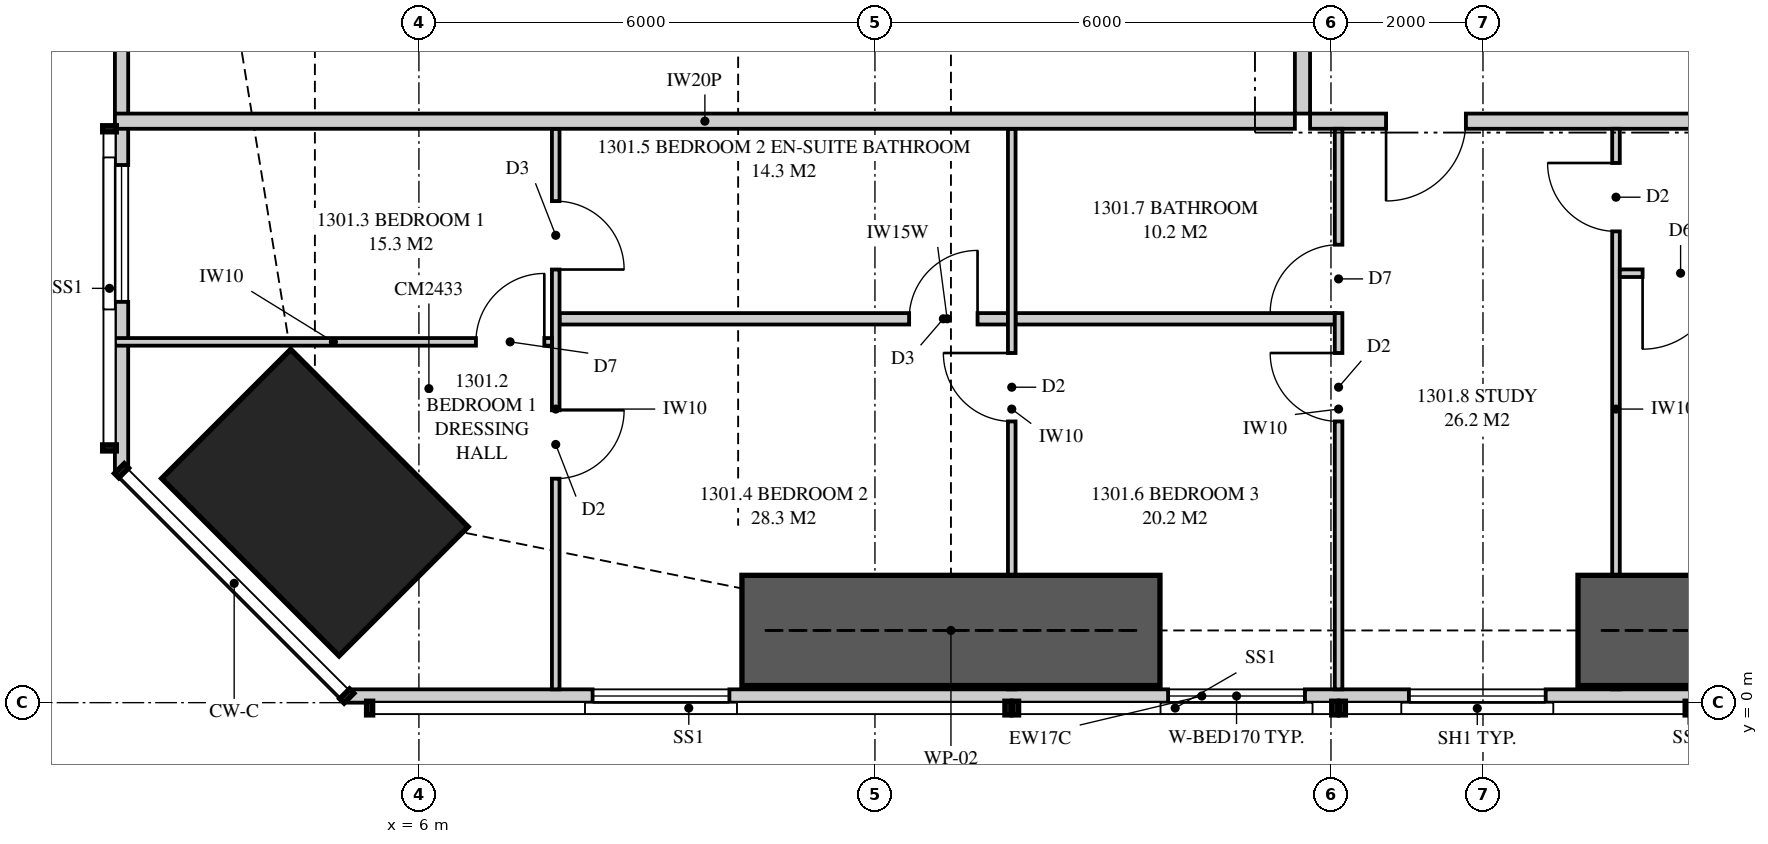
"""IFC4 building model, lengths in metres.
Left out: names, types, materials, properties, quantities, classifications, styles, units other than length and angle.
Written with IfcOpenShell. Run it as: python <this file> out.ifc"""

import sys

from ifc_helpers import new_model, si_unit, direction, frame, frame_2d, origin, origin_2d, place, context, subcontext, project, spatial, polyline, rectangle, outline, extrude, element, fill, save


model = new_model("IFC4")
c1 = context("Model", 3, precision=1e-05, world=origin(), true_north=direction((0.0, 1.0)))
c2 = subcontext(c1, "Body", "Model", "MODEL_VIEW")
j1 = project(units=[si_unit("LENGTHUNIT", "METRE"), si_unit("PLANEANGLEUNIT", "RADIAN")], contexts=[c1])
p1 = place(None, origin())
s1 = spatial("IfcSite", under=j1, at=p1, CompositionType="ELEMENT")
p2 = place(p1, origin())
s2 = spatial("IfcBuilding", under=s1, at=p2, CompositionType="ELEMENT")
p3 = place(p2, frame((0.0, 0.0, 51.15)))
s3 = spatial("IfcBuildingStorey", under=s2, at=p3, CompositionType="ELEMENT", Elevation=51.15)
p4 = place(p3, frame((4.631, 2.631, 0.0), z_axis=(0.0, 0.0, 1.0), x_axis=(0.707106781187, 0.707106781187, 0.0)))
e1 = element("IfcColumn", 1, at=p4, inside=s3, PredefinedType="COLUMN", context=c2, shape_type="SweptSolid", body=[
    extrude(rectangle(XDim=2.4, YDim=3.3, at=origin_2d()), origin(), (0.0, 0.0, 1.0), 3.35),
])
p5 = place(p3, frame((5.051, 0.087, 0.0), z_axis=(0.0, 0.0, 1.0), x_axis=(1.0, 0.0, 0.0)))
e2 = element("IfcWall", 2, at=p5, inside=s3, PredefinedType="SOLIDWALL", context=c2, shape_type="SweptSolid", body=[
    extrude(outline(polyline([(0.0, 0.0), (22.499, 0.0), (22.499, 2.15), (7.949, 2.15), (7.949, 3.11), (7.793, 3.11), (7.793, 2.15), (7.745, 2.15), (7.745, 3.11), (0.0, 3.11), (0.0, 0.0)])), frame((0.0, 0.087, 0.0), z_axis=(0.0, -1.0, 0.0), x_axis=(1.0, 0.0, 0.0)), (0.0, 0.0, 1.0), 0.175),
])
p6 = place(p5, frame((3.234, 0.0, 0.4)))
e3 = element("IfcOpeningElement", 3, at=p6, cuts=e2, PredefinedType="OPENING", context=c2, shape_type="SweptSolid", body=[
    extrude(rectangle(XDim=1.8, YDim=1.7, at=frame_2d((0.9, 0.85))), frame((0.0, 0.097, 0.0), z_axis=(0.0, -1.0, 0.0), x_axis=(1.0, 0.0, 0.0)), (0.0, 0.0, 1.0), 0.195),
])
p7 = place(p5, frame((10.806, 0.0, 0.4)))
e4 = element("IfcOpeningElement", 4, at=p7, cuts=e2, PredefinedType="OPENING", context=c2, shape_type="SweptSolid", body=[
    extrude(rectangle(XDim=1.8, YDim=1.7, at=frame_2d((0.9, 0.85))), frame((0.0, 0.097, 0.0), z_axis=(0.0, -1.0, 0.0), x_axis=(1.0, 0.0, 0.0)), (0.0, 0.0, 1.0), 0.195),
])
p8 = place(p5, frame((13.974, 0.0, 0.4)))
e5 = element("IfcOpeningElement", 5, at=p8, cuts=e2, PredefinedType="OPENING", context=c2, shape_type="SweptSolid", body=[
    extrude(rectangle(XDim=1.8, YDim=1.7, at=frame_2d((0.9, 0.85))), frame((0.0, 0.097, 0.0), z_axis=(0.0, -1.0, 0.0), x_axis=(1.0, 0.0, 0.0)), (0.0, 0.0, 1.0), 0.195),
])
p9 = place(p3, frame((2.087, 18.8, 0.0), z_axis=(0.0, 0.0, 1.0), x_axis=(0.0, -1.0, 0.0)))
e6 = element("IfcWall", 6, at=p9, inside=s3, PredefinedType="SOLIDWALL", context=c2, shape_type="SweptSolid", body=[
    extrude(outline(polyline([(0.0, 0.0), (15.749, 0.0), (15.749, 3.11), (6.019, 3.11), (6.019, 2.15), (5.926, 2.15), (5.926, 3.11), (5.8, 3.11), (5.8, 2.15), (0.0, 2.15), (0.0, 0.0)])), frame((0.0, 0.087, 0.0), z_axis=(0.0, -1.0, 0.0), x_axis=(1.0, 0.0, 0.0)), (0.0, 0.0, 1.0), 0.175),
])
p10 = place(p9, frame((0.95, 0.0, 0.4)))
e7 = element("IfcOpeningElement", 7, at=p10, cuts=e6, PredefinedType="OPENING", context=c2, shape_type="SweptSolid", body=[
    extrude(rectangle(XDim=1.8, YDim=1.7, at=frame_2d((0.9, 0.85))), frame((0.0, 0.097, 0.0), z_axis=(0.0, -1.0, 0.0), x_axis=(1.0, 0.0, 0.0)), (0.0, 0.0, 1.0), 0.195),
])
p11 = place(p9, frame((8.69, 0.0, 0.4)))
e8 = element("IfcOpeningElement", 8, at=p11, cuts=e6, PredefinedType="OPENING", context=c2, shape_type="SweptSolid", body=[
    extrude(rectangle(XDim=1.2, YDim=1.7, at=frame_2d((0.6, 0.85))), frame((0.0, 0.097, 0.0), z_axis=(0.0, -1.0, 0.0), x_axis=(1.0, 0.0, 0.0)), (0.0, 0.0, 1.0), 0.195),
])
p12 = place(p9, frame((11.727, 0.0, 0.4)))
e9 = element("IfcOpeningElement", 9, at=p12, cuts=e6, PredefinedType="OPENING", context=c2, shape_type="SweptSolid", body=[
    extrude(rectangle(XDim=1.8, YDim=1.7, at=frame_2d((0.9, 0.85))), frame((0.0, 0.097, 0.0), z_axis=(0.0, -1.0, 0.0), x_axis=(1.0, 0.0, 0.0)), (0.0, 0.0, 1.0), 0.195),
])
p13 = place(p3, frame((17.725, 7.65, 0.0), z_axis=(0.0, 0.0, 1.0), x_axis=(1.0, 0.0, 0.0)))
e10 = element("IfcWall", 10, at=p13, inside=s3, PredefinedType="PARTITIONING", context=c2, shape_type="SweptSolid", body=[
    extrude(outline(polyline([(0.0, 0.0), (18.625, 0.0), (18.625, 3.11), (17.612, 3.11), (17.612, 2.541), (16.938, 2.541), (16.938, 3.11), (6.612, 3.11), (6.612, 2.541), (5.938, 2.541), (5.938, 3.11), (0.0, 3.11), (0.0, 0.0)])), frame((0.0, 0.1, 0.0), z_axis=(0.0, -1.0, 0.0), x_axis=(1.0, 0.0, 0.0)), (0.0, 0.0, 1.0), 0.2),
])
p14 = place(p13, frame((1.0, 0.0, 0.0)))
e11 = element("IfcOpeningElement", 11, at=p14, cuts=e10, PredefinedType="OPENING", context=c2, shape_type="SweptSolid", body=[
    extrude(rectangle(XDim=1.05, YDim=2.2, at=frame_2d((0.525, 1.1))), frame((0.0, 0.11, 0.0), z_axis=(0.0, -1.0, 0.0), x_axis=(1.0, 0.0, 0.0)), (0.0, 0.0, 1.0), 0.22),
])
p15 = place(p3, frame((7.8, 0.175, 0.0), z_axis=(0.0, 0.0, 1.0), x_axis=(0.0, 1.0, 0.0)))
e12 = element("IfcWall", 12, at=p15, inside=s3, PredefinedType="PARTITIONING", context=c2, shape_type="SweptSolid", body=[
    extrude(outline(polyline([(0.0, 0.0), (7.375, 0.0), (7.375, 3.11), (2.697, 3.11), (2.697, 2.15), (0.943, 2.15), (0.943, 3.11), (0.0, 3.11), (0.0, 0.0)])), frame((0.0, 0.05, 0.0), z_axis=(0.0, -1.0, 0.0), x_axis=(1.0, 0.0, 0.0)), (0.0, 0.0, 1.0), 0.1),
])
p16 = place(p15, frame((2.772, 0.0, 0.0)))
e13 = element("IfcOpeningElement", 13, at=p16, cuts=e12, PredefinedType="OPENING", context=c2, shape_type="SweptSolid", body=[
    extrude(rectangle(XDim=0.9, YDim=2.1, at=frame_2d((0.45, 1.05))), frame((0.0, 0.06, 0.0), z_axis=(0.0, -1.0, 0.0), x_axis=(1.0, 0.0, 0.0)), (0.0, 0.0, 1.0), 0.12),
])
p17 = place(p15, frame((5.523, 0.0, 0.0)))
e14 = element("IfcOpeningElement", 14, at=p17, cuts=e12, PredefinedType="OPENING", context=c2, shape_type="SweptSolid", body=[
    extrude(rectangle(XDim=0.9, YDim=2.1, at=frame_2d((0.45, 1.05))), frame((0.0, 0.06, 0.0), z_axis=(0.0, -1.0, 0.0), x_axis=(1.0, 0.0, 0.0)), (0.0, 0.0, 1.0), 0.12),
])
p18 = place(p3, frame((13.8, 0.175, 0.0), z_axis=(0.0, 0.0, 1.0), x_axis=(0.0, 1.0, 0.0)))
e15 = element("IfcWall", 15, at=p18, inside=s3, PredefinedType="PARTITIONING", context=c2, shape_type="SweptSolid", body=[
    extrude(outline(polyline([(1.635, 2.15), (0.0, 2.15), (0.0, 0.0), (7.375, 0.0), (7.375, 3.11), (1.635, 3.11), (1.635, 2.15)]), holes=[polyline([(1.021, 0.133), (0.529, 0.133), (0.529, 0.923), (1.021, 0.923), (1.021, 0.133)]), polyline([(1.021, 1.227), (0.529, 1.227), (0.529, 2.017), (1.021, 2.017), (1.021, 1.227)])]), frame((0.0, 0.05, 0.0), z_axis=(0.0, -1.0, 0.0), x_axis=(1.0, 0.0, 0.0)), (0.0, 0.0, 1.0), 0.1),
])
p19 = place(p18, frame((3.525, 0.0, 0.0)))
e16 = element("IfcOpeningElement", 16, at=p19, cuts=e15, PredefinedType="OPENING", context=c2, shape_type="SweptSolid", body=[
    extrude(rectangle(XDim=0.9, YDim=2.1, at=frame_2d((0.45, 1.05))), frame((0.0, 0.06, 0.0), z_axis=(0.0, -1.0, 0.0), x_axis=(1.0, 0.0, 0.0)), (0.0, 0.0, 1.0), 0.12),
])
p20 = place(p3, frame((18.1, 0.175, 0.0), z_axis=(0.0, 0.0, 1.0), x_axis=(0.0, 1.0, 0.0)))
e17 = element("IfcWall", 17, at=p20, inside=s3, PredefinedType="PARTITIONING", context=c2, shape_type="SweptSolid", body=[
    extrude(outline(polyline([(0.0, 0.0), (7.375, 0.0), (7.375, 3.11), (1.635, 3.11), (1.635, 2.15), (0.0, 2.15), (0.0, 3.11), (0.0, 0.0)])), frame((0.0, 0.05, 0.0), z_axis=(0.0, -1.0, 0.0), x_axis=(1.0, 0.0, 0.0)), (0.0, 0.0, 1.0), 0.1),
])
p21 = place(p20, frame((3.525, 0.0, 0.0)))
e18 = element("IfcOpeningElement", 18, at=p21, cuts=e17, PredefinedType="OPENING", context=c2, shape_type="SweptSolid", body=[
    extrude(rectangle(XDim=0.9, YDim=2.1, at=frame_2d((0.45, 1.05))), frame((0.0, 0.06, 0.0), z_axis=(0.0, -1.0, 0.0), x_axis=(1.0, 0.0, 0.0)), (0.0, 0.0, 1.0), 0.12),
])
p22 = place(p20, frame((4.95, 0.0, 0.0)))
e19 = element("IfcOpeningElement", 19, at=p22, cuts=e17, PredefinedType="OPENING", context=c2, shape_type="SweptSolid", body=[
    extrude(rectangle(XDim=0.9, YDim=2.1, at=frame_2d((0.45, 1.05))), frame((0.0, 0.06, 0.0), z_axis=(0.0, -1.0, 0.0), x_axis=(1.0, 0.0, 0.0)), (0.0, 0.0, 1.0), 0.12),
])
p23 = place(p3, frame((2.0, 4.747, 0.0), z_axis=(0.0, 0.0, 1.0), x_axis=(1.0, 0.0, 0.0)))
e20 = element("IfcWall", 20, at=p23, inside=s3, PredefinedType="PARTITIONING", context=c2, shape_type="SweptSolid", body=[
    extrude(outline(polyline([(0.0, 0.0), (5.75, 0.0), (5.75, 3.11), (3.16, 3.11), (3.16, 2.15), (1.417, 2.15), (1.417, 3.11), (0.0, 3.11), (0.0, 0.0)])), frame((0.0, 0.05, 0.0), z_axis=(0.0, -1.0, 0.0), x_axis=(1.0, 0.0, 0.0)), (0.0, 0.0, 1.0), 0.1),
])
p24 = place(p23, frame((4.75, 0.0, 0.0)))
e21 = element("IfcOpeningElement", 21, at=p24, cuts=e20, PredefinedType="OPENING", context=c2, shape_type="SweptSolid", body=[
    extrude(rectangle(XDim=0.9, YDim=2.1, at=frame_2d((0.45, 1.05))), frame((0.0, 0.06, 0.0), z_axis=(0.0, -1.0, 0.0), x_axis=(1.0, 0.0, 0.0)), (0.0, 0.0, 1.0), 0.12),
])
p25 = place(p3, frame((7.85, 5.05, 0.0), z_axis=(0.0, 0.0, 1.0), x_axis=(1.0, 0.0, 0.0)))
e22 = element("IfcWall", 22, at=p25, inside=s3, PredefinedType="PLUMBINGWALL", context=c2, shape_type="SweptSolid", body=[
    extrude(outline(polyline([(0.0, 0.0), (5.9, 0.0), (5.9, 3.11), (5.462, 3.11), (5.462, 2.541), (4.838, 2.541), (4.838, 3.11), (3.635, 3.11), (3.635, 2.51), (1.065, 2.51), (1.065, 3.11), (0.0, 3.11), (0.0, 0.0)])), frame((0.0, 0.075, 0.0), z_axis=(0.0, -1.0, 0.0), x_axis=(1.0, 0.0, 0.0)), (0.0, 0.0, 1.0), 0.15),
])
p26 = place(p25, frame((4.6, 0.0, 0.0)))
e23 = element("IfcOpeningElement", 23, at=p26, cuts=e22, PredefinedType="OPENING", context=c2, shape_type="SweptSolid", body=[
    extrude(rectangle(XDim=0.9, YDim=2.1, at=frame_2d((0.45, 1.05))), frame((0.0, 0.085, 0.0), z_axis=(0.0, -1.0, 0.0), x_axis=(1.0, 0.0, 0.0)), (0.0, 0.0, 1.0), 0.17),
])
p27 = place(p3, frame((13.85, 5.05, 0.0), z_axis=(0.0, 0.0, 1.0), x_axis=(1.0, 0.0, 0.0)))
e24 = element("IfcWall", 24, at=p27, inside=s3, PredefinedType="PLUMBINGWALL", context=c2, shape_type="SweptSolid", body=[
    extrude(rectangle(XDim=4.2, YDim=0.15, at=frame_2d((2.1, 0.0))), origin(), (0.0, 0.0, 1.0), 3.11),
])
p28 = place(p3, frame((21.75, 0.175, 0.0), z_axis=(0.0, 0.0, 1.0), x_axis=(0.0, 1.0, 0.0)))
e25 = element("IfcWall", 25, at=p28, inside=s3, PredefinedType="PARTITIONING", context=c2, shape_type="SweptSolid", body=[
    extrude(outline(polyline([(0.0, 0.0), (7.375, 0.0), (7.375, 3.11), (1.635, 3.11), (1.635, 2.15), (0.0, 2.15), (0.0, 3.11), (0.0, 0.0)])), frame((0.0, 0.05, 0.0), z_axis=(0.0, -1.0, 0.0), x_axis=(1.0, 0.0, 0.0)), (0.0, 0.0, 1.0), 0.1),
])
p29 = place(p28, frame((6.025, 0.0, 0.0)))
e26 = element("IfcOpeningElement", 26, at=p29, cuts=e25, PredefinedType="OPENING", context=c2, shape_type="SweptSolid", body=[
    extrude(rectangle(XDim=0.9, YDim=2.1, at=frame_2d((0.45, 1.05))), frame((0.0, 0.06, 0.0), z_axis=(0.0, -1.0, 0.0), x_axis=(1.0, 0.0, 0.0)), (0.0, 0.0, 1.0), 0.12),
])
p30 = place(p3, frame((21.8, 5.65, 0.0), z_axis=(0.0, 0.0, 1.0), x_axis=(1.0, 0.0, 0.0)))
e27 = element("IfcWall", 27, at=p30, inside=s3, PredefinedType="PARTITIONING", context=c2, shape_type="SweptSolid", body=[
    extrude(outline(polyline([(0.0, 0.0), (10.9, 0.0), (10.9, 3.11), (2.487, 3.11), (2.487, 2.541), (1.913, 2.541), (1.913, 3.11), (0.0, 3.11), (0.0, 0.0)])), frame((0.0, 0.05, 0.0), z_axis=(0.0, -1.0, 0.0), x_axis=(1.0, 0.0, 0.0)), (0.0, 0.0, 1.0), 0.1),
])
p31 = place(p30, frame((0.3, 0.0, 0.0)))
e28 = element("IfcOpeningElement", 28, at=p31, cuts=e27, PredefinedType="OPENING", context=c2, shape_type="SweptSolid", body=[
    extrude(rectangle(XDim=1.0, YDim=2.1, at=frame_2d((0.5, 1.05))), frame((0.0, 0.06, 0.0), z_axis=(0.0, -1.0, 0.0), x_axis=(1.0, 0.0, 0.0)), (0.0, 0.0, 1.0), 0.12),
])
p32 = place(p3, frame((2.0, 7.65, 0.0), z_axis=(0.0, 0.0, 1.0), x_axis=(1.0, 0.0, 0.0)))
e29 = element("IfcWall", 29, at=p32, inside=s3, PredefinedType="PARTITIONING", context=c2, shape_type="SweptSolid", body=[
    extrude(outline(polyline([(0.0, 0.0), (15.525, 0.0), (15.525, 3.11), (11.337, 3.11), (11.337, 2.541), (10.663, 2.541), (10.663, 3.11), (9.51, 3.11), (9.51, 2.51), (6.89, 2.51), (6.89, 3.11), (2.969, 3.11), (2.969, 2.541), (2.74, 2.541), (2.74, 2.15), (0.896, 2.15), (0.896, 3.11), (0.0, 3.11), (0.0, 0.0)])), frame((0.0, 0.1, 0.0), z_axis=(0.0, -1.0, 0.0), x_axis=(1.0, 0.0, 0.0)), (0.0, 0.0, 1.0), 0.2),
])
p33 = place(p3, frame((17.625, 7.75, 0.0), z_axis=(0.0, 0.0, 1.0), x_axis=(0.0, 1.0, 0.0)))
e30 = element("IfcWall", 30, at=p33, inside=s3, PredefinedType="PARTITIONING", context=c2, shape_type="SweptSolid", body=[
    extrude(rectangle(XDim=1.45, YDim=0.2, at=frame_2d((0.725, 0.0))), origin(), (0.0, 0.0, 1.0), 3.11),
])
for number, where, z_axis, x_axis in (
    (31, (10.25, 0.95, 0.0), (0.0, 0.0, 1.0), (1.0, 0.0, 0.0)),
    (32, (21.25, 0.95, 0.0), (0.0, 0.0, 1.0), (1.0, 0.0, 0.0)),
):
    element("IfcWall", number, at=place(p3, frame(where, z_axis=z_axis, x_axis=x_axis)), inside=s3, PredefinedType="SHEAR", context=c2, shape_type="SweptSolid", body=[
        extrude(rectangle(XDim=5.5, YDim=1.45, at=frame_2d((2.75, 0.0))), origin(), (0.0, 0.0, 1.0), 3.35),
    ])
p34 = place(p6, origin())
e33 = element("IfcWindow", 33, at=p34, inside=s3, PartitioningType="SINGLE_PANEL", PredefinedType="WINDOW", context=c2, shape_type="SweptSolid", body=[
    extrude(rectangle(XDim=1.8, YDim=1.7, at=frame_2d((0.9, 0.85))), frame((0.0, 0.03, 0.0), z_axis=(0.0, -1.0, 0.0), x_axis=(1.0, 0.0, 0.0)), (0.0, 0.0, 1.0), 0.06),
])
fill(e3, e33)
p35 = place(p7, origin())
e34 = element("IfcWindow", 34, at=p35, inside=s3, PartitioningType="SINGLE_PANEL", PredefinedType="WINDOW", context=c2, shape_type="SweptSolid", body=[
    extrude(rectangle(XDim=1.8, YDim=1.7, at=frame_2d((0.9, 0.85))), frame((0.0, 0.03, 0.0), z_axis=(0.0, -1.0, 0.0), x_axis=(1.0, 0.0, 0.0)), (0.0, 0.0, 1.0), 0.06),
])
fill(e4, e34)
p36 = place(p8, origin())
e35 = element("IfcWindow", 35, at=p36, inside=s3, PartitioningType="SINGLE_PANEL", PredefinedType="WINDOW", context=c2, shape_type="SweptSolid", body=[
    extrude(rectangle(XDim=1.8, YDim=1.7, at=frame_2d((0.9, 0.85))), frame((0.0, 0.03, 0.0), z_axis=(0.0, -1.0, 0.0), x_axis=(1.0, 0.0, 0.0)), (0.0, 0.0, 1.0), 0.06),
])
fill(e5, e35)
p37 = place(p12, origin())
e36 = element("IfcWindow", 36, at=p37, inside=s3, PartitioningType="SINGLE_PANEL", PredefinedType="WINDOW", context=c2, shape_type="SweptSolid", body=[
    extrude(rectangle(XDim=1.8, YDim=1.7, at=frame_2d((0.9, 0.85))), frame((0.0, 0.03, 0.0), z_axis=(0.0, -1.0, 0.0), x_axis=(1.0, 0.0, 0.0)), (0.0, 0.0, 1.0), 0.06),
])
fill(e9, e36)
p38 = place(p14, frame((1.05, 0.0, 0.0), z_axis=(0.0, 0.0, 1.0), x_axis=(-1.0, 0.0, 0.0)))
e37 = element("IfcDoor", 37, at=p38, inside=s3, OperationType="SINGLE_SWING_RIGHT", PredefinedType="DOOR", context=c2, shape_type="SweptSolid", body=[
    extrude(rectangle(XDim=1.05, YDim=2.2, at=frame_2d((0.525, 1.1))), frame((0.0, 0.025, 0.0), z_axis=(0.0, -1.0, 0.0), x_axis=(1.0, 0.0, 0.0)), (0.0, 0.0, 1.0), 0.05),
])
fill(e11, e37)
p39 = place(p24, origin())
e38 = element("IfcDoor", 38, at=p39, inside=s3, OperationType="SINGLE_SWING_RIGHT", PredefinedType="DOOR", context=c2, shape_type="SweptSolid", body=[
    extrude(rectangle(XDim=0.9, YDim=2.1, at=frame_2d((0.45, 1.05))), frame((0.0, 0.025, 0.0), z_axis=(0.0, -1.0, 0.0), x_axis=(1.0, 0.0, 0.0)), (0.0, 0.0, 1.0), 0.05),
])
fill(e21, e38)
p40 = place(p16, frame((0.9, 0.0, 0.0), z_axis=(0.0, 0.0, 1.0), x_axis=(-1.0, 0.0, 0.0)))
e39 = element("IfcDoor", 39, at=p40, inside=s3, OperationType="SINGLE_SWING_LEFT", PredefinedType="DOOR", context=c2, shape_type="SweptSolid", body=[
    extrude(rectangle(XDim=0.9, YDim=2.1, at=frame_2d((0.45, 1.05))), frame((0.0, 0.025, 0.0), z_axis=(0.0, -1.0, 0.0), x_axis=(1.0, 0.0, 0.0)), (0.0, 0.0, 1.0), 0.05),
])
fill(e13, e39)
p41 = place(p19, origin())
e40 = element("IfcDoor", 40, at=p41, inside=s3, OperationType="SINGLE_SWING_RIGHT", PredefinedType="DOOR", context=c2, shape_type="SweptSolid", body=[
    extrude(rectangle(XDim=0.9, YDim=2.1, at=frame_2d((0.45, 1.05))), frame((0.0, 0.025, 0.0), z_axis=(0.0, -1.0, 0.0), x_axis=(1.0, 0.0, 0.0)), (0.0, 0.0, 1.0), 0.05),
])
fill(e16, e40)
p42 = place(p26, origin())
e41 = element("IfcDoor", 41, at=p42, inside=s3, OperationType="SINGLE_SWING_RIGHT", PredefinedType="DOOR", context=c2, shape_type="SweptSolid", body=[
    extrude(rectangle(XDim=0.9, YDim=2.1, at=frame_2d((0.45, 1.05))), frame((0.0, 0.025, 0.0), z_axis=(0.0, -1.0, 0.0), x_axis=(1.0, 0.0, 0.0)), (0.0, 0.0, 1.0), 0.05),
])
fill(e23, e41)
p43 = place(p21, origin())
e42 = element("IfcDoor", 42, at=p43, inside=s3, OperationType="SINGLE_SWING_RIGHT", PredefinedType="DOOR", context=c2, shape_type="SweptSolid", body=[
    extrude(rectangle(XDim=0.9, YDim=2.1, at=frame_2d((0.45, 1.05))), frame((0.0, 0.025, 0.0), z_axis=(0.0, -1.0, 0.0), x_axis=(1.0, 0.0, 0.0)), (0.0, 0.0, 1.0), 0.05),
])
fill(e18, e42)
p44 = place(p22, origin())
e43 = element("IfcDoor", 43, at=p44, inside=s3, OperationType="SINGLE_SWING_LEFT", PredefinedType="DOOR", context=c2, shape_type="SweptSolid", body=[
    extrude(rectangle(XDim=0.9, YDim=2.1, at=frame_2d((0.45, 1.05))), frame((0.0, 0.025, 0.0), z_axis=(0.0, -1.0, 0.0), x_axis=(1.0, 0.0, 0.0)), (0.0, 0.0, 1.0), 0.05),
])
fill(e19, e43)
p45 = place(p17, frame((0.9, 0.0, 0.0), z_axis=(0.0, 0.0, 1.0), x_axis=(-1.0, 0.0, 0.0)))
e44 = element("IfcDoor", 44, at=p45, inside=s3, OperationType="SINGLE_SWING_RIGHT", PredefinedType="DOOR", context=c2, shape_type="SweptSolid", body=[
    extrude(rectangle(XDim=0.9, YDim=2.1, at=frame_2d((0.45, 1.05))), frame((0.0, 0.025, 0.0), z_axis=(0.0, -1.0, 0.0), x_axis=(1.0, 0.0, 0.0)), (0.0, 0.0, 1.0), 0.05),
])
fill(e14, e44)
p46 = place(p29, origin())
e45 = element("IfcDoor", 45, at=p46, inside=s3, OperationType="SINGLE_SWING_RIGHT", PredefinedType="DOOR", context=c2, shape_type="SweptSolid", body=[
    extrude(rectangle(XDim=0.9, YDim=2.1, at=frame_2d((0.45, 1.05))), frame((0.0, 0.025, 0.0), z_axis=(0.0, -1.0, 0.0), x_axis=(1.0, 0.0, 0.0)), (0.0, 0.0, 1.0), 0.05),
])
fill(e26, e45)
p47 = place(p31, frame((1.0, 0.0, 0.0), z_axis=(0.0, 0.0, 1.0), x_axis=(-1.0, 0.0, 0.0)))
e46 = element("IfcDoor", 46, at=p47, inside=s3, OperationType="SINGLE_SWING_RIGHT", PredefinedType="DOOR", context=c2, shape_type="SweptSolid", body=[
    extrude(rectangle(XDim=1.0, YDim=2.1, at=frame_2d((0.5, 1.05))), frame((0.0, 0.025, 0.0), z_axis=(0.0, -1.0, 0.0), x_axis=(1.0, 0.0, 0.0)), (0.0, 0.0, 1.0), 0.05),
])
fill(e28, e46)
save(model, sys.argv[1])
